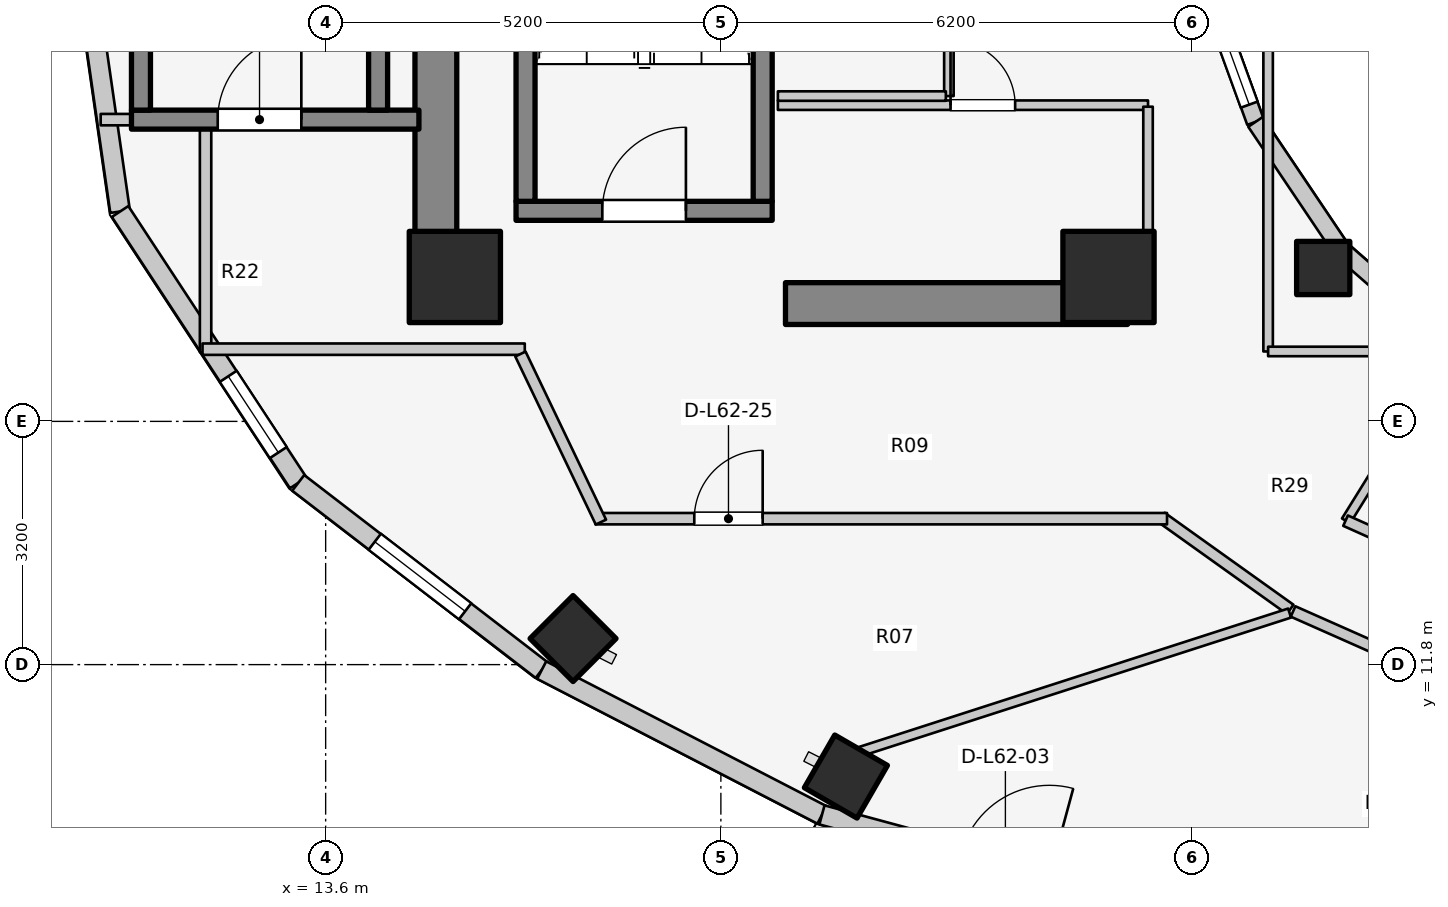
"""IFC4 building model, lengths in metres.
Left out: names, types, materials, properties, quantities, classifications, styles, units other than length and angle.
Written with IfcOpenShell. Run it as: python <this file> out.ifc"""

import sys

from ifc_helpers import new_model, si_unit, direction, frame, frame_2d, origin, origin_2d, place, context, subcontext, project, spatial, rectangle, extrude, element, fill, save


model = new_model("IFC4")
c1 = context("Model", 3, precision=1e-05, world=origin(), true_north=direction((0.0, 1.0)))
c2 = subcontext(c1, "Body", "Model", "MODEL_VIEW")
j1 = project(units=[si_unit("LENGTHUNIT", "METRE"), si_unit("PLANEANGLEUNIT", "RADIAN")], contexts=[c1])
p1 = place(None, origin())
s1 = spatial("IfcSite", under=j1, at=p1, CompositionType="ELEMENT")
p2 = place(p1, origin())
s2 = spatial("IfcBuilding", under=s1, at=p2, CompositionType="ELEMENT")
p3 = place(p2, frame((0.0, 0.0, 204.7)))
s3 = spatial("IfcBuildingStorey", under=s2, at=p3, CompositionType="ELEMENT", Elevation=204.7)
p4 = place(p3, frame((15.05, 17.05, 0.0), z_axis=(0.0, 0.0, 1.0), x_axis=(0.0, 1.0, 0.0)))
e1 = element("IfcWall", 1, at=p4, inside=s3, PredefinedType="SHEAR", context=c2, shape_type="SweptSolid", body=[
    extrude(rectangle(XDim=12.8, YDim=0.55, at=frame_2d((6.4, 0.0))), origin(), (0.0, 0.0, 1.0), 3.1),
])
p5 = place(p3, frame((19.65, 16.55, 0.0), z_axis=(0.0, 0.0, 1.0), x_axis=(1.0, 0.0, 0.0)))
e2 = element("IfcWall", 2, at=p5, inside=s3, PredefinedType="SHEAR", context=c2, shape_type="SweptSolid", body=[
    extrude(rectangle(XDim=4.5, YDim=0.55, at=frame_2d((2.25, 0.0))), origin(), (0.0, 0.0, 1.0), 3.1),
])
p6 = place(p3, frame((16.105, 17.77, 0.0), z_axis=(0.0, 0.0, 1.0), x_axis=(1.0, 0.0, 0.0)))
e3 = element("IfcWall", 3, at=p6, inside=s3, PredefinedType="SOLIDWALL", context=c2, shape_type="SweptSolid", body=[
    extrude(rectangle(XDim=3.37, YDim=0.25, at=frame_2d((1.685, 0.0))), origin(), (0.0, 0.0, 1.0), 3.1),
])
p7 = place(p6, frame((1.135, 0.0, 0.0)))
e4 = element("IfcOpeningElement", 4, at=p7, cuts=e3, PredefinedType="OPENING", context=c2, shape_type="SweptSolid", body=[
    extrude(rectangle(XDim=1.1, YDim=2.1, at=frame_2d((0.55, 1.05))), frame((0.0, 0.135, 0.0), z_axis=(0.0, -1.0, 0.0), x_axis=(1.0, 0.0, 0.0)), (0.0, 0.0, 1.0), 0.27),
])
for number, where, z_axis, x_axis in (
    (5, (16.23, 17.895, 0.0), (0.0, 0.0, 1.0), (0.0, 1.0, 0.0)),
    (6, (19.35, 17.895, 0.0), (0.0, 0.0, 1.0), (0.0, 1.0, 0.0)),
):
    element("IfcWall", number, at=place(p3, frame(where, z_axis=z_axis, x_axis=x_axis)), inside=s3, PredefinedType="SOLIDWALL", context=c2, shape_type="SweptSolid", body=[
        extrude(rectangle(XDim=7.81, YDim=0.25, at=frame_2d((3.905, 0.0))), origin(), (0.0, 0.0, 1.0), 3.1),
    ])
p8 = place(p3, frame((11.045, 18.97, 0.0), z_axis=(0.0, 0.0, 1.0), x_axis=(1.0, 0.0, 0.0)))
e7 = element("IfcWall", 7, at=p8, inside=s3, PredefinedType="SOLIDWALL", context=c2, shape_type="SweptSolid", body=[
    extrude(rectangle(XDim=3.782, YDim=0.25, at=frame_2d((1.891, 0.0))), origin(), (0.0, 0.0, 1.0), 3.1),
])
p9 = place(p8, frame((1.135, 0.0, 0.0)))
e8 = element("IfcOpeningElement", 8, at=p9, cuts=e7, PredefinedType="OPENING", context=c2, shape_type="SweptSolid", body=[
    extrude(rectangle(XDim=1.1, YDim=2.1, at=frame_2d((0.55, 1.05))), frame((0.0, 0.135, 0.0), z_axis=(0.0, -1.0, 0.0), x_axis=(1.0, 0.0, 0.0)), (0.0, 0.0, 1.0), 0.27),
])
for number, where, z_axis, x_axis in (
    (9, (11.17, 19.095, 0.0), (0.0, 0.0, 1.0), (0.0, 1.0, 0.0)),
    (10, (14.29, 19.095, 0.0), (0.0, 0.0, 1.0), (0.0, 1.0, 0.0)),
):
    element("IfcWall", number, at=place(p3, frame(where, z_axis=z_axis, x_axis=x_axis)), inside=s3, PredefinedType="SOLIDWALL", context=c2, shape_type="SweptSolid", body=[
        extrude(rectangle(XDim=7.81, YDim=0.25, at=frame_2d((3.905, 0.0))), origin(), (0.0, 0.0, 1.0), 3.1),
    ])
for number, where, z_axis, x_axis in (
    (11, (15.3, 16.9, 0.0), (0.0, 0.0, 1.0), (1.0, 0.0, 0.0)),
    (12, (23.9, 16.9, 0.0), (0.0, 0.0, 1.0), (1.0, 0.0, 0.0)),
):
    element("IfcColumn", number, at=place(p3, frame(where, z_axis=z_axis, x_axis=x_axis)), inside=s3, PredefinedType="COLUMN", context=c2, shape_type="SweptSolid", body=[
        extrude(rectangle(XDim=1.2, YDim=1.2, at=origin_2d()), origin(), (0.0, 0.0, 1.0), 3.1),
    ])
p10 = place(p3, frame((26.725, 17.018, 0.0), z_axis=(0.0, 0.0, 1.0), x_axis=(1.0, 0.0, 0.0)))
e13 = element("IfcColumn", 13, at=p10, inside=s3, PredefinedType="COLUMN", context=c2, shape_type="SweptSolid", body=[
    extrude(rectangle(XDim=0.7, YDim=0.7, at=origin_2d()), origin(), (0.0, 0.0, 1.0), 3.1),
])
for number, where, z_axis, x_axis in (
    (14, (16.855, 12.143, 0.0), (0.0, 0.0, 1.0), (-0.707, -0.707, 0.0)),
    (15, (20.445, 10.327, 0.0), (0.0, 0.0, 1.0), (-0.5, -0.866, 0.0)),
):
    element("IfcColumn", number, at=place(p3, frame(where, z_axis=z_axis, x_axis=x_axis)), inside=s3, PredefinedType="COLUMN", context=c2, shape_type="SweptSolid", body=[
        extrude(rectangle(XDim=0.8, YDim=0.8, at=origin_2d()), origin(), (0.0, 0.0, 1.0), 3.1),
    ])
p11 = place(p3, frame((25.123, 20.898, 0.0), z_axis=(0.0, 0.0, 1.0), x_axis=(0.341423187295, -0.93990968033, 0.0)))
e16 = element("IfcWall", 16, at=p11, inside=s3, PredefinedType="STANDARD", context=c2, shape_type="SweptSolid", body=[
    extrude(rectangle(XDim=2.084, YDim=0.23, at=frame_2d((1.042, 0.0))), origin(), (0.0, 0.0, 1.0), 2.84),
])
p12 = place(p11, frame((0.242, 0.0, 0.85)))
e17 = element("IfcOpeningElement", 17, at=p12, cuts=e16, PredefinedType="OPENING", context=c2, shape_type="SweptSolid", body=[
    extrude(rectangle(XDim=1.6, YDim=1.65, at=frame_2d((0.8, 0.825))), frame((0.0, 0.125, 0.0), z_axis=(0.0, -1.0, 0.0), x_axis=(1.0, 0.0, 0.0)), (0.0, 0.0, 1.0), 0.25),
])
p13 = place(p3, frame((25.834, 18.94, 0.0), z_axis=(0.0, 0.0, 1.0), x_axis=(0.558197800898, -0.829707909492, 0.0)))
e18 = element("IfcWall", 18, at=p13, inside=s3, PredefinedType="STANDARD", context=c2, shape_type="SweptSolid", body=[
    extrude(rectangle(XDim=2.027, YDim=0.23, at=frame_2d((1.013, 0.0))), origin(), (0.0, 0.0, 1.0), 2.16),
])
p14 = place(p3, frame((26.965, 17.258, 0.0), z_axis=(0.0, 0.0, 1.0), x_axis=(0.752576694707, -0.658504607869, 0.0)))
e19 = element("IfcWall", 19, at=p14, inside=s3, PredefinedType="STANDARD", context=c2, shape_type="SweptSolid", body=[
    extrude(rectangle(XDim=1.959, YDim=0.23, at=frame_2d((0.98, 0.0))), origin(), (0.0, 0.0, 1.0), 2.16),
])
p15 = place(p3, frame((10.14, 23.0, 0.0), z_axis=(0.0, 0.0, 1.0), x_axis=(0.142712754019, -0.989764148593, 0.0)))
e20 = element("IfcWall", 20, at=p15, inside=s3, PredefinedType="STANDARD", context=c2, shape_type="SweptSolid", body=[
    extrude(rectangle(XDim=5.293, YDim=0.26, at=frame_2d((2.646, 0.0))), origin(), (0.0, 0.0, 1.0), 2.85),
])
p16 = place(p15, frame((1.458, 0.0, 0.75)))
e21 = element("IfcOpeningElement", 21, at=p16, cuts=e20, PredefinedType="OPENING", context=c2, shape_type="SweptSolid", body=[
    extrude(rectangle(XDim=1.2, YDim=1.5, at=frame_2d((0.6, 0.75))), frame((0.0, 0.14, 0.0), z_axis=(0.0, -1.0, 0.0), x_axis=(1.0, 0.0, 0.0)), (0.0, 0.0, 1.0), 0.28),
])
p17 = place(p3, frame((10.895, 17.761, 0.0), z_axis=(0.0, 0.0, 1.0), x_axis=(0.548776305075, -0.835969238064, 0.0)))
e22 = element("IfcWall", 22, at=p17, inside=s3, PredefinedType="STANDARD", context=c2, shape_type="SweptSolid", body=[
    extrude(rectangle(XDim=4.271, YDim=0.26, at=frame_2d((2.135, 0.0))), origin(), (0.0, 0.0, 1.0), 2.85),
])
p18 = place(p17, frame((2.594, 0.0, 0.75)))
e23 = element("IfcOpeningElement", 23, at=p18, cuts=e22, PredefinedType="OPENING", context=c2, shape_type="SweptSolid", body=[
    extrude(rectangle(XDim=1.2, YDim=1.5, at=frame_2d((0.6, 0.75))), frame((0.0, 0.14, 0.0), z_axis=(0.0, -1.0, 0.0), x_axis=(1.0, 0.0, 0.0)), (0.0, 0.0, 1.0), 0.28),
])
p19 = place(p3, frame((13.239, 14.191, 0.0), z_axis=(0.0, 0.0, 1.0), x_axis=(0.792713817907, -0.609593965603, 0.0)))
e24 = element("IfcWall", 24, at=p19, inside=s3, PredefinedType="STANDARD", context=c2, shape_type="SweptSolid", body=[
    extrude(rectangle(XDim=4.041, YDim=0.26, at=frame_2d((2.021, 0.0))), origin(), (0.0, 0.0, 1.0), 2.85),
])
p20 = place(p19, frame((1.271, 0.0, 0.75)))
e25 = element("IfcOpeningElement", 25, at=p20, cuts=e24, PredefinedType="OPENING", context=c2, shape_type="SweptSolid", body=[
    extrude(rectangle(XDim=1.5, YDim=1.6, at=frame_2d((0.75, 0.8))), frame((0.0, 0.14, 0.0), z_axis=(0.0, -1.0, 0.0), x_axis=(1.0, 0.0, 0.0)), (0.0, 0.0, 1.0), 0.28),
])
p21 = place(p3, frame((16.442, 11.728, 0.0), z_axis=(0.0, 0.0, 1.0), x_axis=(0.88849146803, -0.458893137057, 0.0)))
e26 = element("IfcWall", 26, at=p21, inside=s3, PredefinedType="STANDARD", context=c2, shape_type="SweptSolid", body=[
    extrude(rectangle(XDim=4.15, YDim=0.26, at=frame_2d((2.075, 0.0))), origin(), (0.0, 0.0, 1.0), 2.85),
])
p22 = place(p3, frame((20.13, 9.823, 0.0), z_axis=(0.0, 0.0, 1.0), x_axis=(0.965213026382, -0.261464746576, 0.0)))
e27 = element("IfcWall", 27, at=p22, inside=s3, PredefinedType="STANDARD", context=c2, shape_type="SweptSolid", body=[
    extrude(rectangle(XDim=5.001, YDim=0.26, at=frame_2d((2.5, 0.0))), origin(), (0.0, 0.0, 1.0), 2.88),
])
p23 = place(p22, frame((1.9, 0.0, 0.0)))
e28 = element("IfcOpeningElement", 28, at=p23, cuts=e27, PredefinedType="OPENING", context=c2, shape_type="SweptSolid", body=[
    extrude(rectangle(XDim=1.2, YDim=2.2, at=frame_2d((0.6, 1.1))), frame((0.0, 0.14, 0.0), z_axis=(0.0, -1.0, 0.0), x_axis=(1.0, 0.0, 0.0)), (0.0, 0.0, 1.0), 0.28),
])
p24 = place(p3, frame((19.55, 19.16, 0.0), z_axis=(0.0, 0.0, 1.0), x_axis=(1.0, 0.0, 0.0)))
e29 = element("IfcWall", 29, at=p24, inside=s3, PredefinedType="PARTITIONING", context=c2, shape_type="SweptSolid", body=[
    extrude(rectangle(XDim=4.87, YDim=0.125, at=frame_2d((2.435, 0.0))), origin(), (0.0, 0.0, 1.0), 2.12),
])
p25 = place(p24, frame((2.272, 0.0, 0.0)))
e30 = element("IfcOpeningElement", 30, at=p25, cuts=e29, PredefinedType="OPENING", context=c2, shape_type="SweptSolid", body=[
    extrude(rectangle(XDim=0.85, YDim=2.05, at=frame_2d((0.425, 1.025))), frame((0.0, 0.073, 0.0), z_axis=(0.0, -1.0, 0.0), x_axis=(1.0, 0.0, 0.0)), (0.0, 0.0, 1.0), 0.145),
])
p26 = place(p3, frame((24.42, 17.1, 0.0), z_axis=(0.0, 0.0, 1.0), x_axis=(0.0, 1.0, 0.0)))
e31 = element("IfcWall", 31, at=p26, inside=s3, PredefinedType="PARTITIONING", context=c2, shape_type="SweptSolid", body=[
    extrude(rectangle(XDim=2.04, YDim=0.125, at=frame_2d((1.02, 0.0))), origin(), (0.0, 0.0, 1.0), 2.232),
])
p27 = place(p3, frame((21.8, 19.28, 0.0), z_axis=(0.0, 0.0, 1.0), x_axis=(0.0, 1.0, 0.0)))
e32 = element("IfcWall", 32, at=p27, inside=s3, PredefinedType="PARTITIONING", context=c2, shape_type="SweptSolid", body=[
    extrude(rectangle(XDim=2.4, YDim=0.125, at=frame_2d((1.2, 0.0))), origin(), (0.0, 0.0, 1.0), 2.855),
])
p28 = place(p27, frame((0.7, 0.0, 0.0)))
e33 = element("IfcOpeningElement", 33, at=p28, cuts=e32, PredefinedType="OPENING", context=c2, shape_type="SweptSolid", body=[
    extrude(rectangle(XDim=0.85, YDim=2.05, at=frame_2d((0.425, 1.025))), frame((0.0, 0.073, 0.0), z_axis=(0.0, -1.0, 0.0), x_axis=(1.0, 0.0, 0.0)), (0.0, 0.0, 1.0), 0.145),
])
p29 = place(p3, frame((19.55, 19.28, 0.0), z_axis=(0.0, 0.0, 1.0), x_axis=(1.0, 0.0, 0.0)))
e34 = element("IfcWall", 34, at=p29, inside=s3, PredefinedType="PARTITIONING", context=c2, shape_type="SweptSolid", body=[
    extrude(rectangle(XDim=2.21, YDim=0.125, at=frame_2d((1.105, 0.0))), origin(), (0.0, 0.0, 1.0), 2.12),
])
p30 = place(p3, frame((28.45, 15.985, 0.0), z_axis=(0.0, 0.0, 1.0), x_axis=(-0.527527080983, -0.849538215049, 0.0)))
e35 = element("IfcWall", 35, at=p30, inside=s3, PredefinedType="PARTITIONING", context=c2, shape_type="SweptSolid", body=[
    extrude(rectangle(XDim=2.701, YDim=0.125, at=frame_2d((1.351, 0.0))), origin(), (0.0, 0.0, 1.0), 2.376),
])
p31 = place(p3, frame((27.019, 13.694, 0.0), z_axis=(0.0, 0.0, 1.0), x_axis=(0.912628408652, -0.408790151203, 0.0)))
e36 = element("IfcWall", 36, at=p31, inside=s3, PredefinedType="PARTITIONING", context=c2, shape_type="SweptSolid", body=[
    extrude(rectangle(XDim=2.638, YDim=0.15, at=frame_2d((1.319, 0.0))), origin(), (0.0, 0.0, 1.0), 2.376),
])
p32 = place(p3, frame((26.0, 15.92, 0.0), z_axis=(0.0, 0.0, 1.0), x_axis=(0.0, 1.0, 0.0)))
e37 = element("IfcWall", 37, at=p32, inside=s3, PredefinedType="PARTITIONING", context=c2, shape_type="SweptSolid", body=[
    extrude(rectangle(XDim=4.28, YDim=0.125, at=frame_2d((2.14, 0.0))), origin(), (0.0, 0.0, 1.0), 2.232),
])
p33 = place(p3, frame((26.0, 15.92, 0.0), z_axis=(0.0, 0.0, 1.0), x_axis=(1.0, 0.0, 0.0)))
e38 = element("IfcWall", 38, at=p33, inside=s3, PredefinedType="PARTITIONING", context=c2, shape_type="SweptSolid", body=[
    extrude(rectangle(XDim=2.6, YDim=0.125, at=frame_2d((1.3, 0.0))), origin(), (0.0, 0.0, 1.0), 2.232),
])
p34 = place(p3, frame((10.64, 18.97, 0.0), z_axis=(0.0, 0.0, 1.0), x_axis=(1.0, 0.0, 0.0)))
e39 = element("IfcWall", 39, at=p34, inside=s3, PredefinedType="PARTITIONING", context=c2, shape_type="SweptSolid", body=[
    extrude(rectangle(XDim=0.4, YDim=0.15, at=frame_2d((0.2, 0.0))), origin(), (0.0, 0.0, 1.0), 2.855),
])
p35 = place(p3, frame((12.02, 15.91, 0.0), z_axis=(0.0, 0.0, 1.0), x_axis=(0.0, 1.0, 0.0)))
e40 = element("IfcWall", 40, at=p35, inside=s3, PredefinedType="PARTITIONING", context=c2, shape_type="SweptSolid", body=[
    extrude(rectangle(XDim=2.93, YDim=0.15, at=frame_2d((1.465, 0.0))), origin(), (0.0, 0.0, 1.0), 2.855),
])
p36 = place(p3, frame((11.98, 15.95, 0.0), z_axis=(0.0, 0.0, 1.0), x_axis=(1.0, 0.0, 0.0)))
e41 = element("IfcWall", 41, at=p36, inside=s3, PredefinedType="PARTITIONING", context=c2, shape_type="SweptSolid", body=[
    extrude(rectangle(XDim=4.24, YDim=0.15, at=frame_2d((2.12, 0.0))), origin(), (0.0, 0.0, 1.0), 2.22),
])
p37 = place(p3, frame((26.29, 12.527, 0.0), z_axis=(0.0, 0.0, 1.0), x_axis=(-0.813780999276, 0.581171648669, 0.0)))
e42 = element("IfcWall", 42, at=p37, inside=s3, PredefinedType="PARTITIONING", context=c2, shape_type="SweptSolid", body=[
    extrude(rectangle(XDim=2.082, YDim=0.15, at=frame_2d((1.041, 0.0))), origin(), (0.0, 0.0, 1.0), 2.376),
])
p38 = place(p3, frame((17.15, 13.72, 0.0), z_axis=(0.0, 0.0, 1.0), x_axis=(1.0, 0.0, 0.0)))
e43 = element("IfcWall", 43, at=p38, inside=s3, PredefinedType="PARTITIONING", context=c2, shape_type="SweptSolid", body=[
    extrude(rectangle(XDim=7.52, YDim=0.15, at=frame_2d((3.76, 0.0))), origin(), (0.0, 0.0, 1.0), 2.376),
])
p39 = place(p38, frame((1.3, 0.0, 0.0)))
e44 = element("IfcOpeningElement", 44, at=p39, cuts=e43, PredefinedType="OPENING", context=c2, shape_type="SweptSolid", body=[
    extrude(rectangle(XDim=0.9, YDim=2.1, at=frame_2d((0.45, 1.05))), frame((0.0, 0.085, 0.0), z_axis=(0.0, -1.0, 0.0), x_axis=(1.0, 0.0, 0.0)), (0.0, 0.0, 1.0), 0.17),
])
p40 = place(p3, frame((17.222, 13.675, 0.0), z_axis=(0.0, 0.0, 1.0), x_axis=(-0.431973389813, 0.901886351207, 0.0)))
e45 = element("IfcWall", 45, at=p40, inside=s3, PredefinedType="PARTITIONING", context=c2, shape_type="SweptSolid", body=[
    extrude(rectangle(XDim=2.452, YDim=0.15, at=frame_2d((1.226, 0.0))), origin(), (0.0, 0.0, 1.0), 2.855),
])
p41 = place(p3, frame((26.283, 12.478, 0.0), z_axis=(0.0, 0.0, 1.0), x_axis=(-0.951711719757, -0.306993163568, 0.0)))
e46 = element("IfcWall", 46, at=p41, inside=s3, PredefinedType="PARTITIONING", context=c2, shape_type="SweptSolid", body=[
    extrude(rectangle(XDim=5.934, YDim=0.125, at=frame_2d((2.967, 0.0))), origin(), (0.0, 0.0, 1.0), 2.376),
])
p42 = place(p3, frame((26.328, 12.499, 0.0), z_axis=(0.0, 0.0, 1.0), x_axis=(0.914139569865, -0.405399613724, 0.0)))
e47 = element("IfcWall", 47, at=p42, inside=s3, PredefinedType="PARTITIONING", context=c2, shape_type="SweptSolid", body=[
    extrude(rectangle(XDim=3.005, YDim=0.15, at=frame_2d((1.502, 0.0))), origin(), (0.0, 0.0, 1.0), 2.376),
])
p43 = place(p12, origin())
e48 = element("IfcWindow", 48, at=p43, inside=s3, PartitioningType="SINGLE_PANEL", PredefinedType="WINDOW", context=c2, shape_type="SweptSolid", body=[
    extrude(rectangle(XDim=1.6, YDim=1.65, at=frame_2d((0.8, 0.825))), frame((0.0, 0.03, 0.0), z_axis=(0.0, -1.0, 0.0), x_axis=(1.0, 0.0, 0.0)), (0.0, 0.0, 1.0), 0.06),
])
fill(e17, e48)
p44 = place(p18, origin())
e49 = element("IfcWindow", 49, at=p44, inside=s3, PartitioningType="SINGLE_PANEL", PredefinedType="WINDOW", context=c2, shape_type="SweptSolid", body=[
    extrude(rectangle(XDim=1.2, YDim=1.5, at=frame_2d((0.6, 0.75))), frame((0.0, 0.03, 0.0), z_axis=(0.0, -1.0, 0.0), x_axis=(1.0, 0.0, 0.0)), (0.0, 0.0, 1.0), 0.06),
])
fill(e23, e49)
p45 = place(p20, origin())
e50 = element("IfcWindow", 50, at=p45, inside=s3, PartitioningType="SINGLE_PANEL", PredefinedType="WINDOW", context=c2, shape_type="SweptSolid", body=[
    extrude(rectangle(XDim=1.5, YDim=1.6, at=frame_2d((0.75, 0.8))), frame((0.0, 0.03, 0.0), z_axis=(0.0, -1.0, 0.0), x_axis=(1.0, 0.0, 0.0)), (0.0, 0.0, 1.0), 0.06),
])
fill(e25, e50)
p46 = place(p7, origin())
e51 = element("IfcDoor", 51, at=p46, inside=s3, OperationType="SINGLE_SWING_RIGHT", PredefinedType="DOOR", context=c2, shape_type="SweptSolid", body=[
    extrude(rectangle(XDim=1.1, YDim=2.1, at=frame_2d((0.55, 1.05))), frame((0.0, 0.025, 0.0), z_axis=(0.0, -1.0, 0.0), x_axis=(1.0, 0.0, 0.0)), (0.0, 0.0, 1.0), 0.05),
])
fill(e4, e51)
p47 = place(p9, origin())
e52 = element("IfcDoor", 52, at=p47, inside=s3, OperationType="SINGLE_SWING_RIGHT", PredefinedType="DOOR", context=c2, shape_type="SweptSolid", body=[
    extrude(rectangle(XDim=1.1, YDim=2.1, at=frame_2d((0.55, 1.05))), frame((0.0, 0.025, 0.0), z_axis=(0.0, -1.0, 0.0), x_axis=(1.0, 0.0, 0.0)), (0.0, 0.0, 1.0), 0.05),
])
fill(e8, e52)
p48 = place(p25, origin())
e53 = element("IfcDoor", 53, at=p48, inside=s3, OperationType="SINGLE_SWING_LEFT", PredefinedType="DOOR", context=c2, shape_type="SweptSolid", body=[
    extrude(rectangle(XDim=0.85, YDim=2.05, at=frame_2d((0.425, 1.025))), frame((0.0, 0.025, 0.0), z_axis=(0.0, -1.0, 0.0), x_axis=(1.0, 0.0, 0.0)), (0.0, 0.0, 1.0), 0.05),
])
fill(e30, e53)
p49 = place(p39, origin())
e54 = element("IfcDoor", 54, at=p49, inside=s3, OperationType="SINGLE_SWING_RIGHT", PredefinedType="DOOR", context=c2, shape_type="SweptSolid", body=[
    extrude(rectangle(XDim=0.9, YDim=2.1, at=frame_2d((0.45, 1.05))), frame((0.0, 0.025, 0.0), z_axis=(0.0, -1.0, 0.0), x_axis=(1.0, 0.0, 0.0)), (0.0, 0.0, 1.0), 0.05),
])
fill(e44, e54)
save(model, sys.argv[1])
